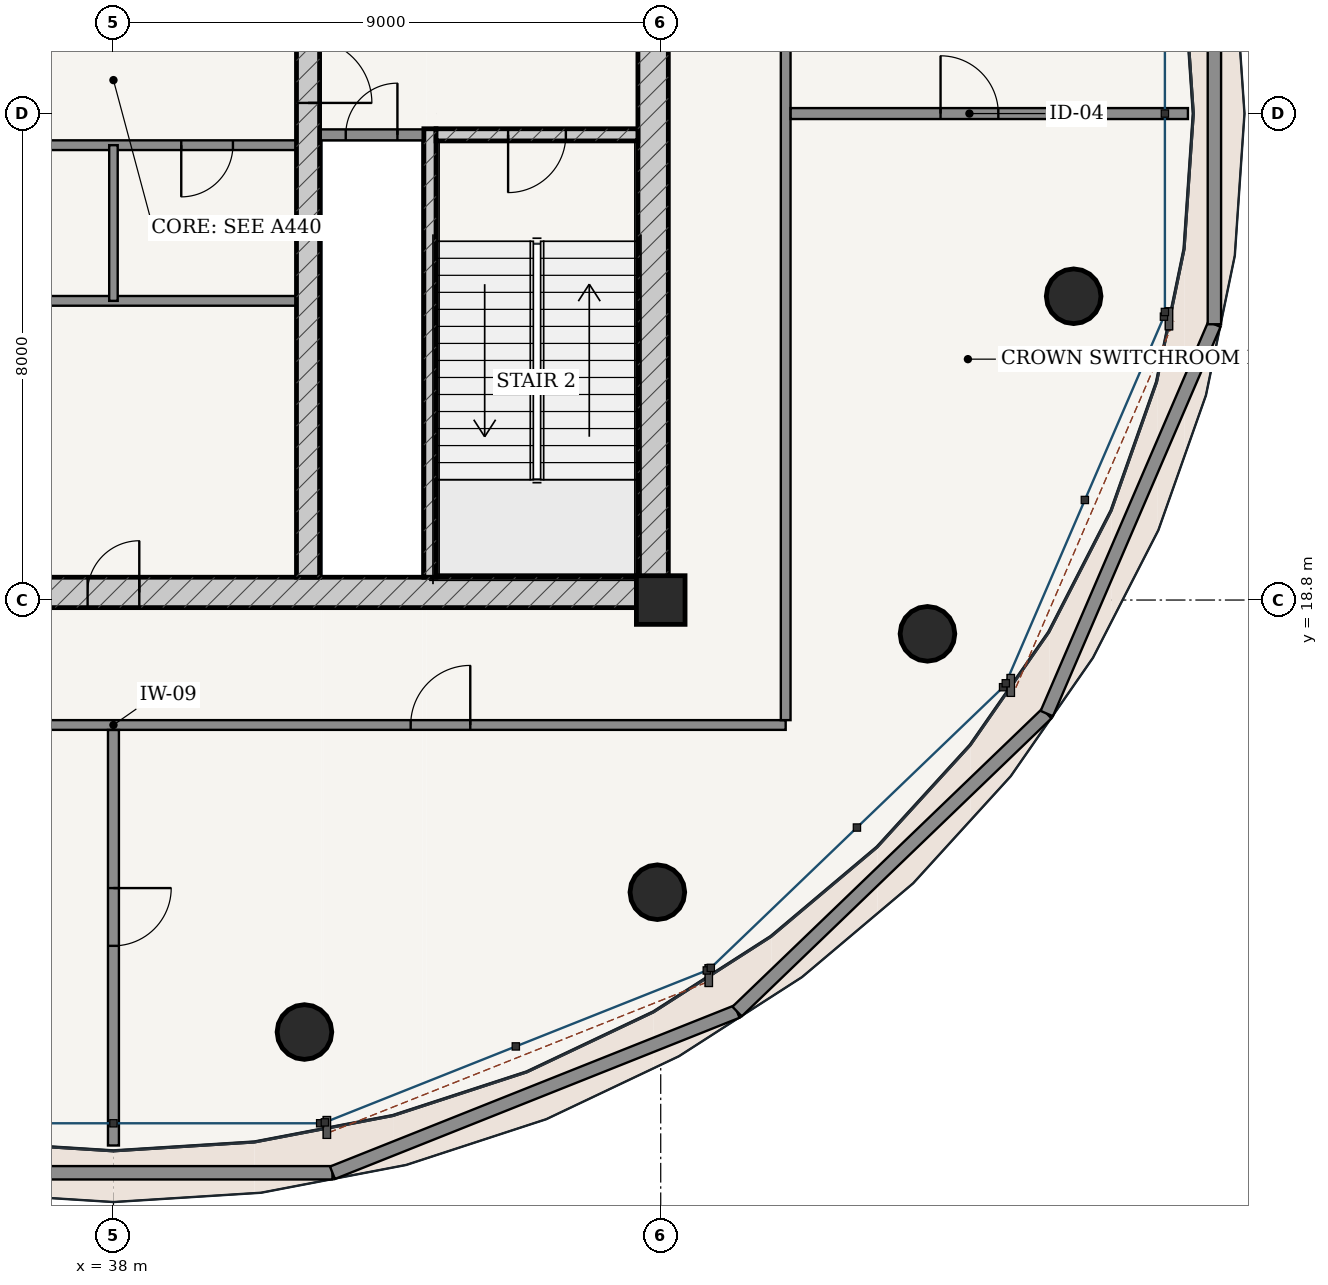
"""IFC4 building model, lengths in metres.
Left out: names, types, materials, properties, quantities, classifications, styles, units other than length and angle.
Written with IfcOpenShell. Run it as: python <this file> out.ifc"""

import sys

from ifc_helpers import new_model, si_unit, direction, frame, frame_2d, origin, origin_2d, place, context, subcontext, project, spatial, rectangle, hollow_circle, extrude, source, transform, mapped, element, fill, save


model = new_model("IFC4")
c1 = context("Model", 3, precision=1e-05, world=origin(), true_north=direction((-0.2419218956, 0.970295726276)))
c2 = subcontext(c1, "Body", "Model", "MODEL_VIEW")
j1 = project(units=[si_unit("LENGTHUNIT", "METRE"), si_unit("PLANEANGLEUNIT", "RADIAN")], contexts=[c1])
p1 = place(None, origin())
s1 = spatial("IfcSite", under=j1, at=p1, CompositionType="ELEMENT")
p2 = place(p1, origin())
s2 = spatial("IfcBuilding", under=s1, at=p2, CompositionType="ELEMENT")
p3 = place(p2, frame((0.0, 0.0, 306.1)))
s3 = spatial("IfcBuildingStorey", under=s2, at=p3, CompositionType="ELEMENT", Elevation=306.1)
p4 = place(p3, frame((47.0, 18.8, 0.0), z_axis=(0.0, 0.0, 1.0), x_axis=(1.0, 0.0, 0.0)))
e1 = element("IfcColumn", 1, at=p4, inside=s3, PredefinedType="COLUMN", context=c2, shape_type="SweptSolid", body=[
    extrude(rectangle(XDim=0.8, YDim=0.8, at=origin_2d()), origin(), (0.0, 0.0, 1.0), 5.2),
])
p5 = place(p3, frame((28.875, 18.925, 0.0), z_axis=(0.0, 0.0, 1.0), x_axis=(1.0, 0.0, 0.0)))
e2 = element("IfcWall", 2, at=p5, inside=s3, PredefinedType="SHEAR", context=c2, shape_type="SweptSolid", body=[
    extrude(rectangle(XDim=18.25, YDim=0.5, at=frame_2d((9.125, 0.0))), origin(), (0.0, 0.0, 1.0), 4.78),
])
p6 = place(p5, frame((8.7, 0.0, 0.0)))
e3 = element("IfcOpeningElement", 3, at=p6, cuts=e2, PredefinedType="OPENING", context=c2, shape_type="SweptSolid", body=[
    extrude(rectangle(XDim=0.85, YDim=2.1, at=frame_2d((0.425, 1.05))), frame((0.0, 0.26, 0.0), z_axis=(0.0, -1.0, 0.0), x_axis=(1.0, 0.0, 0.0)), (0.0, 0.0, 1.0), 0.52),
])
p7 = place(p3, frame((46.875, 19.175, 0.0), z_axis=(0.0, 0.0, 1.0), x_axis=(0.0, 1.0, 0.0)))
e4 = element("IfcWall", 4, at=p7, inside=s3, PredefinedType="SHEAR", context=c2, shape_type="SweptSolid", body=[
    extrude(rectangle(XDim=15.25, YDim=0.5, at=frame_2d((7.625, 0.0))), origin(), (0.0, 0.0, 1.0), 4.78),
])
p8 = place(p7, frame((9.875, 0.0, 0.0)))
e5 = element("IfcOpeningElement", 5, at=p8, cuts=e4, PredefinedType="OPENING", context=c2, shape_type="SweptSolid", body=[
    extrude(rectangle(XDim=1.5, YDim=2.2, at=frame_2d((0.75, 1.1))), frame((0.0, 0.26, 0.0), z_axis=(0.0, -1.0, 0.0), x_axis=(1.0, 0.0, 0.0)), (0.0, 0.0, 1.0), 0.52),
])
p9 = place(p3, frame((43.205, 19.175, 0.0), z_axis=(0.0, 0.0, 1.0), x_axis=(0.0, 1.0, 0.0)))
e6 = element("IfcWall", 6, at=p9, inside=s3, PredefinedType="SOLIDWALL", context=c2, shape_type="SweptSolid", body=[
    extrude(rectangle(XDim=7.375, YDim=0.2, at=frame_2d((3.688, 0.0))), origin(), (0.0, 0.0, 1.0), 4.78),
])
p10 = place(p3, frame((43.305, 26.45, 0.0), z_axis=(0.0, 0.0, 1.0), x_axis=(1.0, 0.0, 0.0)))
e7 = element("IfcWall", 7, at=p10, inside=s3, PredefinedType="SOLIDWALL", context=c2, shape_type="SweptSolid", body=[
    extrude(rectangle(XDim=3.32, YDim=0.2, at=frame_2d((1.66, 0.0))), origin(), (0.0, 0.0, 1.0), 4.78),
])
p11 = place(p10, frame((1.185, 0.0, 0.0)))
e8 = element("IfcOpeningElement", 8, at=p11, cuts=e7, PredefinedType="OPENING", context=c2, shape_type="SweptSolid", body=[
    extrude(rectangle(XDim=0.95, YDim=2.15, at=frame_2d((0.475, 1.075))), frame((0.0, 0.11, 0.0), z_axis=(0.0, -1.0, 0.0), x_axis=(1.0, 0.0, 0.0)), (0.0, 0.0, 1.0), 0.22),
])
p12 = place(p3, frame((41.2, 19.175, 0.0), z_axis=(0.0, 0.0, 1.0), x_axis=(0.0, 1.0, 0.0)))
e9 = element("IfcWall", 9, at=p12, inside=s3, PredefinedType="SHEAR", context=c2, shape_type="SweptSolid", body=[
    extrude(rectangle(XDim=15.25, YDim=0.38, at=frame_2d((7.625, 0.0))), origin(), (0.0, 0.0, 1.0), 4.78),
])
p13 = place(p12, frame((7.8, 0.0, 0.0)))
e10 = element("IfcOpeningElement", 10, at=p13, cuts=e9, PredefinedType="OPENING", context=c2, shape_type="SweptSolid", body=[
    extrude(rectangle(XDim=1.05, YDim=2.15, at=frame_2d((0.525, 1.075))), frame((0.0, 0.2, 0.0), z_axis=(0.0, -1.0, 0.0), x_axis=(1.0, 0.0, 0.0)), (0.0, 0.0, 1.0), 0.4),
])
for number, where, z_axis, x_axis in (
    (11, (41.141, 11.696, 0.0), (0.0, 0.0, 1.0), (1.0, 0.0, 0.0)),
    (12, (46.945, 13.995, 0.0), (0.0, 0.0, 1.0), (1.0, 0.0, 0.0)),
    (13, (51.387, 18.244, 0.0), (0.0, 0.0, 1.0), (1.0, 0.0, 0.0)),
    (14, (53.791, 23.796, 0.0), (0.0, 0.0, 1.0), (1.0, 0.0, 0.0)),
):
    element("IfcColumn", number, at=place(p3, frame(where, z_axis=z_axis, x_axis=x_axis)), inside=s3, PredefinedType="COLUMN", context=c2, shape_type="SweptSolid", body=[
        extrude(hollow_circle(Radius=0.45, WallThickness=0.032, at=origin_2d()), origin(), (0.0, 0.0, 1.0), 5.2),
    ])
p14 = place(p3, frame((34.399, 9.381, 0.0), z_axis=(0.0, 0.0, 1.0), x_axis=(1.0, 0.0, 0.0)))
e15 = element("IfcWall", 15, at=p14, inside=s3, PredefinedType="PARAPET", context=c2, shape_type="SweptSolid", body=[
    extrude(rectangle(XDim=7.203, YDim=0.22, at=frame_2d((3.601, 0.0))), origin(), (0.0, 0.0, 1.0), 1.15),
])
p15 = place(p3, frame((41.601, 9.381, 0.0), z_axis=(0.0, 0.0, 1.0), x_axis=(0.928955406434, 0.370191643419, 0.0)))
e16 = element("IfcWall", 16, at=p15, inside=s3, PredefinedType="PARAPET", context=c2, shape_type="SweptSolid", body=[
    extrude(rectangle(XDim=7.164, YDim=0.22, at=frame_2d((3.582, 0.0))), origin(), (0.0, 0.0, 1.0), 1.15),
])
p16 = place(p3, frame((48.256, 12.033, 0.0), z_axis=(0.0, 0.0, 1.0), x_axis=(0.720637211965, 0.693312345723, 0.0)))
e17 = element("IfcWall", 17, at=p16, inside=s3, PredefinedType="PARAPET", context=c2, shape_type="SweptSolid", body=[
    extrude(rectangle(XDim=7.067, YDim=0.22, at=frame_2d((3.534, 0.0))), origin(), (0.0, 0.0, 1.0), 1.15),
])
p17 = place(p3, frame((53.349, 16.933, 0.0), z_axis=(0.0, 0.0, 1.0), x_axis=(0.39544480712, 0.918489741109, 0.0)))
e18 = element("IfcWall", 18, at=p17, inside=s3, PredefinedType="PARAPET", context=c2, shape_type="SweptSolid", body=[
    extrude(rectangle(XDim=6.97, YDim=0.22, at=frame_2d((3.485, 0.0))), origin(), (0.0, 0.0, 1.0), 1.15),
])
p18 = place(p3, frame((56.105, 23.335, 0.0), z_axis=(0.0, 0.0, 1.0), x_axis=(0.0, 1.0, 0.0)))
e19 = element("IfcWall", 19, at=p18, inside=s3, PredefinedType="PARAPET", context=c2, shape_type="SweptSolid", body=[
    extrude(rectangle(XDim=6.93, YDim=0.22, at=frame_2d((3.465, 0.0))), origin(), (0.0, 0.0, 1.0), 1.15),
])
p19 = place(p3, frame((41.39, 26.45, 0.0), z_axis=(0.0, 0.0, 1.0), x_axis=(1.0, 0.0, 0.0)))
e20 = element("IfcWall", 20, at=p19, inside=s3, PredefinedType="PARTITIONING", context=c2, shape_type="SweptSolid", body=[
    extrude(rectangle(XDim=1.71, YDim=0.18, at=frame_2d((0.855, 0.0))), origin(), (0.0, 0.0, 1.0), 4.78),
])
p20 = place(p19, frame((0.43, 0.0, 0.0)))
e21 = element("IfcOpeningElement", 21, at=p20, cuts=e20, PredefinedType="OPENING", context=c2, shape_type="SweptSolid", body=[
    extrude(rectangle(XDim=0.85, YDim=2.1, at=frame_2d((0.425, 1.05))), frame((0.0, 0.1, 0.0), z_axis=(0.0, -1.0, 0.0), x_axis=(1.0, 0.0, 0.0)), (0.0, 0.0, 1.0), 0.2),
])
p21 = place(p3, frame((34.99, 26.28, 0.0), z_axis=(0.0, 0.0, 1.0), x_axis=(1.0, 0.0, 0.0)))
e22 = element("IfcWall", 22, at=p21, inside=s3, PredefinedType="PARTITIONING", context=c2, shape_type="SweptSolid", body=[
    extrude(rectangle(XDim=6.02, YDim=0.16, at=frame_2d((3.01, 0.0))), origin(), (0.0, 0.0, 1.0), 4.78),
])
p22 = place(p21, frame((1.045, 0.0, 0.0)))
e23 = element("IfcOpeningElement", 23, at=p22, cuts=e22, PredefinedType="OPENING", context=c2, shape_type="SweptSolid", body=[
    extrude(rectangle(XDim=0.85, YDim=2.1, at=frame_2d((0.425, 1.05))), frame((0.0, 0.09, 0.0), z_axis=(0.0, -1.0, 0.0), x_axis=(1.0, 0.0, 0.0)), (0.0, 0.0, 1.0), 0.18),
])
p23 = place(p21, frame((4.125, 0.0, 0.0)))
e24 = element("IfcOpeningElement", 24, at=p23, cuts=e22, PredefinedType="OPENING", context=c2, shape_type="SweptSolid", body=[
    extrude(rectangle(XDim=0.85, YDim=2.1, at=frame_2d((0.425, 1.05))), frame((0.0, 0.09, 0.0), z_axis=(0.0, -1.0, 0.0), x_axis=(1.0, 0.0, 0.0)), (0.0, 0.0, 1.0), 0.18),
])
p24 = place(p3, frame((34.99, 23.72, 0.0), z_axis=(0.0, 0.0, 1.0), x_axis=(1.0, 0.0, 0.0)))
e25 = element("IfcWall", 25, at=p24, inside=s3, PredefinedType="PARTITIONING", context=c2, shape_type="SweptSolid", body=[
    extrude(rectangle(XDim=6.02, YDim=0.16, at=frame_2d((3.01, 0.0))), origin(), (0.0, 0.0, 1.0), 4.78),
])
p25 = place(p3, frame((38.0, 23.72, 0.0), z_axis=(0.0, 0.0, 1.0), x_axis=(0.0, 1.0, 0.0)))
e26 = element("IfcWall", 26, at=p25, inside=s3, PredefinedType="PARTITIONING", context=c2, shape_type="SweptSolid", body=[
    extrude(rectangle(XDim=2.56, YDim=0.14, at=frame_2d((1.28, 0.0))), origin(), (0.0, 0.0, 1.0), 4.78),
])
p26 = place(p3, frame((26.945, 16.745, 0.0), z_axis=(0.0, 0.0, 1.0), x_axis=(1.0, 0.0, 0.0)))
e27 = element("IfcWall", 27, at=p26, inside=s3, PredefinedType="PARTITIONING", context=c2, shape_type="SweptSolid", body=[
    extrude(rectangle(XDim=22.11, YDim=0.16, at=frame_2d((11.055, 0.0))), origin(), (0.0, 0.0, 1.0), 4.352),
])
p27 = place(p26, frame((5.187, 0.0, 0.0)))
e28 = element("IfcOpeningElement", 28, at=p27, cuts=e27, PredefinedType="OPENING", context=c2, shape_type="SweptSolid", body=[
    extrude(rectangle(XDim=0.98, YDim=2.2, at=frame_2d((0.49, 1.1))), frame((0.0, 0.09, 0.0), z_axis=(0.0, -1.0, 0.0), x_axis=(1.0, 0.0, 0.0)), (0.0, 0.0, 1.0), 0.18),
])
p28 = place(p26, frame((15.943, 0.0, 0.0)))
e29 = element("IfcOpeningElement", 29, at=p28, cuts=e27, PredefinedType="OPENING", context=c2, shape_type="SweptSolid", body=[
    extrude(rectangle(XDim=0.98, YDim=2.2, at=frame_2d((0.49, 1.1))), frame((0.0, 0.09, 0.0), z_axis=(0.0, -1.0, 0.0), x_axis=(1.0, 0.0, 0.0)), (0.0, 0.0, 1.0), 0.18),
])
p29 = place(p3, frame((49.055, 16.825, 0.0), z_axis=(0.0, 0.0, 1.0), x_axis=(0.0, 1.0, 0.0)))
e30 = element("IfcWall", 30, at=p29, inside=s3, PredefinedType="PARTITIONING", context=c2, shape_type="SweptSolid", body=[
    extrude(rectangle(XDim=19.95, YDim=0.16, at=frame_2d((9.975, 0.0))), origin(), (0.0, 0.0, 1.0), 4.352),
])
p30 = place(p3, frame((49.137, 26.8, 0.0), z_axis=(0.0, 0.0, 1.0), x_axis=(1.0, 0.0, 0.0)))
e31 = element("IfcWall", 31, at=p30, inside=s3, PredefinedType="PARTITIONING", context=c2, shape_type="SweptSolid", body=[
    extrude(rectangle(XDim=6.533, YDim=0.18, at=frame_2d((3.267, 0.0))), origin(), (0.0, 0.0, 1.0), 4.411),
])
p31 = place(p30, frame((2.465, 0.0, 0.0)))
e32 = element("IfcOpeningElement", 32, at=p31, cuts=e31, PredefinedType="OPENING", context=c2, shape_type="SweptSolid", body=[
    extrude(rectangle(XDim=0.95, YDim=2.15, at=frame_2d((0.475, 1.075))), frame((0.0, 0.1, 0.0), z_axis=(0.0, -1.0, 0.0), x_axis=(1.0, 0.0, 0.0)), (0.0, 0.0, 1.0), 0.2),
])
p32 = place(p3, frame((38.0, 16.663, 0.0), z_axis=(0.0, 0.0, 1.0), x_axis=(0.0, -1.0, 0.0)))
e33 = element("IfcWall", 33, at=p32, inside=s3, PredefinedType="PARTITIONING", context=c2, shape_type="SweptSolid", body=[
    extrude(rectangle(XDim=6.833, YDim=0.18, at=frame_2d((3.417, 0.0))), origin(), (0.0, 0.0, 1.0), 4.411),
])
p33 = place(p32, frame((2.6, 0.0, 0.0)))
e34 = element("IfcOpeningElement", 34, at=p33, cuts=e33, PredefinedType="OPENING", context=c2, shape_type="SweptSolid", body=[
    extrude(rectangle(XDim=0.95, YDim=2.15, at=frame_2d((0.475, 1.075))), frame((0.0, 0.1, 0.0), z_axis=(0.0, -1.0, 0.0), x_axis=(1.0, 0.0, 0.0)), (0.0, 0.0, 1.0), 0.2),
])
m1 = source(origin(), c2, "Body", "SweptSolid", [
    extrude(rectangle(XDim=1.05, YDim=2.15, at=frame_2d((0.525, 1.075))), frame((0.0, 0.025, 0.0), z_axis=(0.0, -1.0, 0.0), x_axis=(1.0, 0.0, 0.0)), (0.0, 0.0, 1.0), 0.05),
])
p34 = place(p13, frame((1.05, 0.0, 0.0), z_axis=(0.0, 0.0, 1.0), x_axis=(-1.0, 0.0, 0.0)))
e35 = element("IfcDoor", 35, at=p34, inside=s3, OperationType="SINGLE_SWING_RIGHT", PredefinedType="DOOR", context=c2, shape_type="MappedRepresentation", body=[
    mapped(m1, transform((0.0, 0.0, 0.0), scale=1.0)),
])
fill(e10, e35)
m2 = source(origin(), c2, "Body", "SweptSolid", [
    extrude(rectangle(XDim=0.95, YDim=2.15, at=frame_2d((0.475, 1.075))), frame((0.0, 0.025, 0.0), z_axis=(0.0, -1.0, 0.0), x_axis=(1.0, 0.0, 0.0)), (0.0, 0.0, 1.0), 0.05),
])
p35 = place(p11, frame((0.95, 0.0, 0.0), z_axis=(0.0, 0.0, 1.0), x_axis=(-1.0, 0.0, 0.0)))
e36 = element("IfcDoor", 36, at=p35, inside=s3, OperationType="SINGLE_SWING_RIGHT", PredefinedType="DOOR", context=c2, shape_type="MappedRepresentation", body=[
    mapped(m2, transform((0.0, 0.0, 0.0), scale=1.0)),
])
fill(e8, e36)
m3 = source(origin(), c2, "Body", "SweptSolid", [
    extrude(rectangle(XDim=0.85, YDim=2.1, at=frame_2d((0.425, 1.05))), frame((0.0, 0.025, 0.0), z_axis=(0.0, -1.0, 0.0), x_axis=(1.0, 0.0, 0.0)), (0.0, 0.0, 1.0), 0.05),
])
p36 = place(p20, origin())
e37 = element("IfcDoor", 37, at=p36, inside=s3, OperationType="SINGLE_SWING_RIGHT", PredefinedType="DOOR", context=c2, shape_type="MappedRepresentation", body=[
    mapped(m3, transform((0.0, 0.0, 0.0), scale=1.0)),
])
fill(e21, e37)
p37 = place(p23, frame((0.85, 0.0, 0.0), z_axis=(0.0, 0.0, 1.0), x_axis=(-1.0, 0.0, 0.0)))
e38 = element("IfcDoor", 38, at=p37, inside=s3, OperationType="SINGLE_SWING_RIGHT", PredefinedType="DOOR", context=c2, shape_type="MappedRepresentation", body=[
    mapped(m3, transform((0.0, 0.0, 0.0), scale=1.0)),
])
fill(e24, e38)
p38 = place(p6, origin())
e39 = element("IfcDoor", 39, at=p38, inside=s3, OperationType="SINGLE_SWING_RIGHT", PredefinedType="DOOR", context=c2, shape_type="MappedRepresentation", body=[
    mapped(m3, transform((0.0, 0.0, 0.0), scale=1.0)),
])
fill(e3, e39)
m4 = source(origin(), c2, "Body", "SweptSolid", [
    extrude(rectangle(XDim=0.98, YDim=2.2, at=frame_2d((0.49, 1.1))), frame((0.0, 0.025, 0.0), z_axis=(0.0, -1.0, 0.0), x_axis=(1.0, 0.0, 0.0)), (0.0, 0.0, 1.0), 0.05),
])
p39 = place(p28, origin())
e40 = element("IfcDoor", 40, at=p39, inside=s3, OperationType="SINGLE_SWING_RIGHT", PredefinedType="DOOR", context=c2, shape_type="MappedRepresentation", body=[
    mapped(m4, transform((0.0, 0.0, 0.0), scale=1.0)),
])
fill(e29, e40)
p40 = place(p31, origin())
e41 = element("IfcDoor", 41, at=p40, inside=s3, OperationType="SINGLE_SWING_LEFT", PredefinedType="DOOR", context=c2, shape_type="MappedRepresentation", body=[
    mapped(m2, transform((0.0, 0.0, 0.0), scale=1.0)),
])
fill(e32, e41)
p41 = place(p33, origin())
e42 = element("IfcDoor", 42, at=p41, inside=s3, OperationType="SINGLE_SWING_LEFT", PredefinedType="DOOR", context=c2, shape_type="MappedRepresentation", body=[
    mapped(m2, transform((0.0, 0.0, 0.0), scale=1.0)),
])
fill(e34, e42)
save(model, sys.argv[1])
